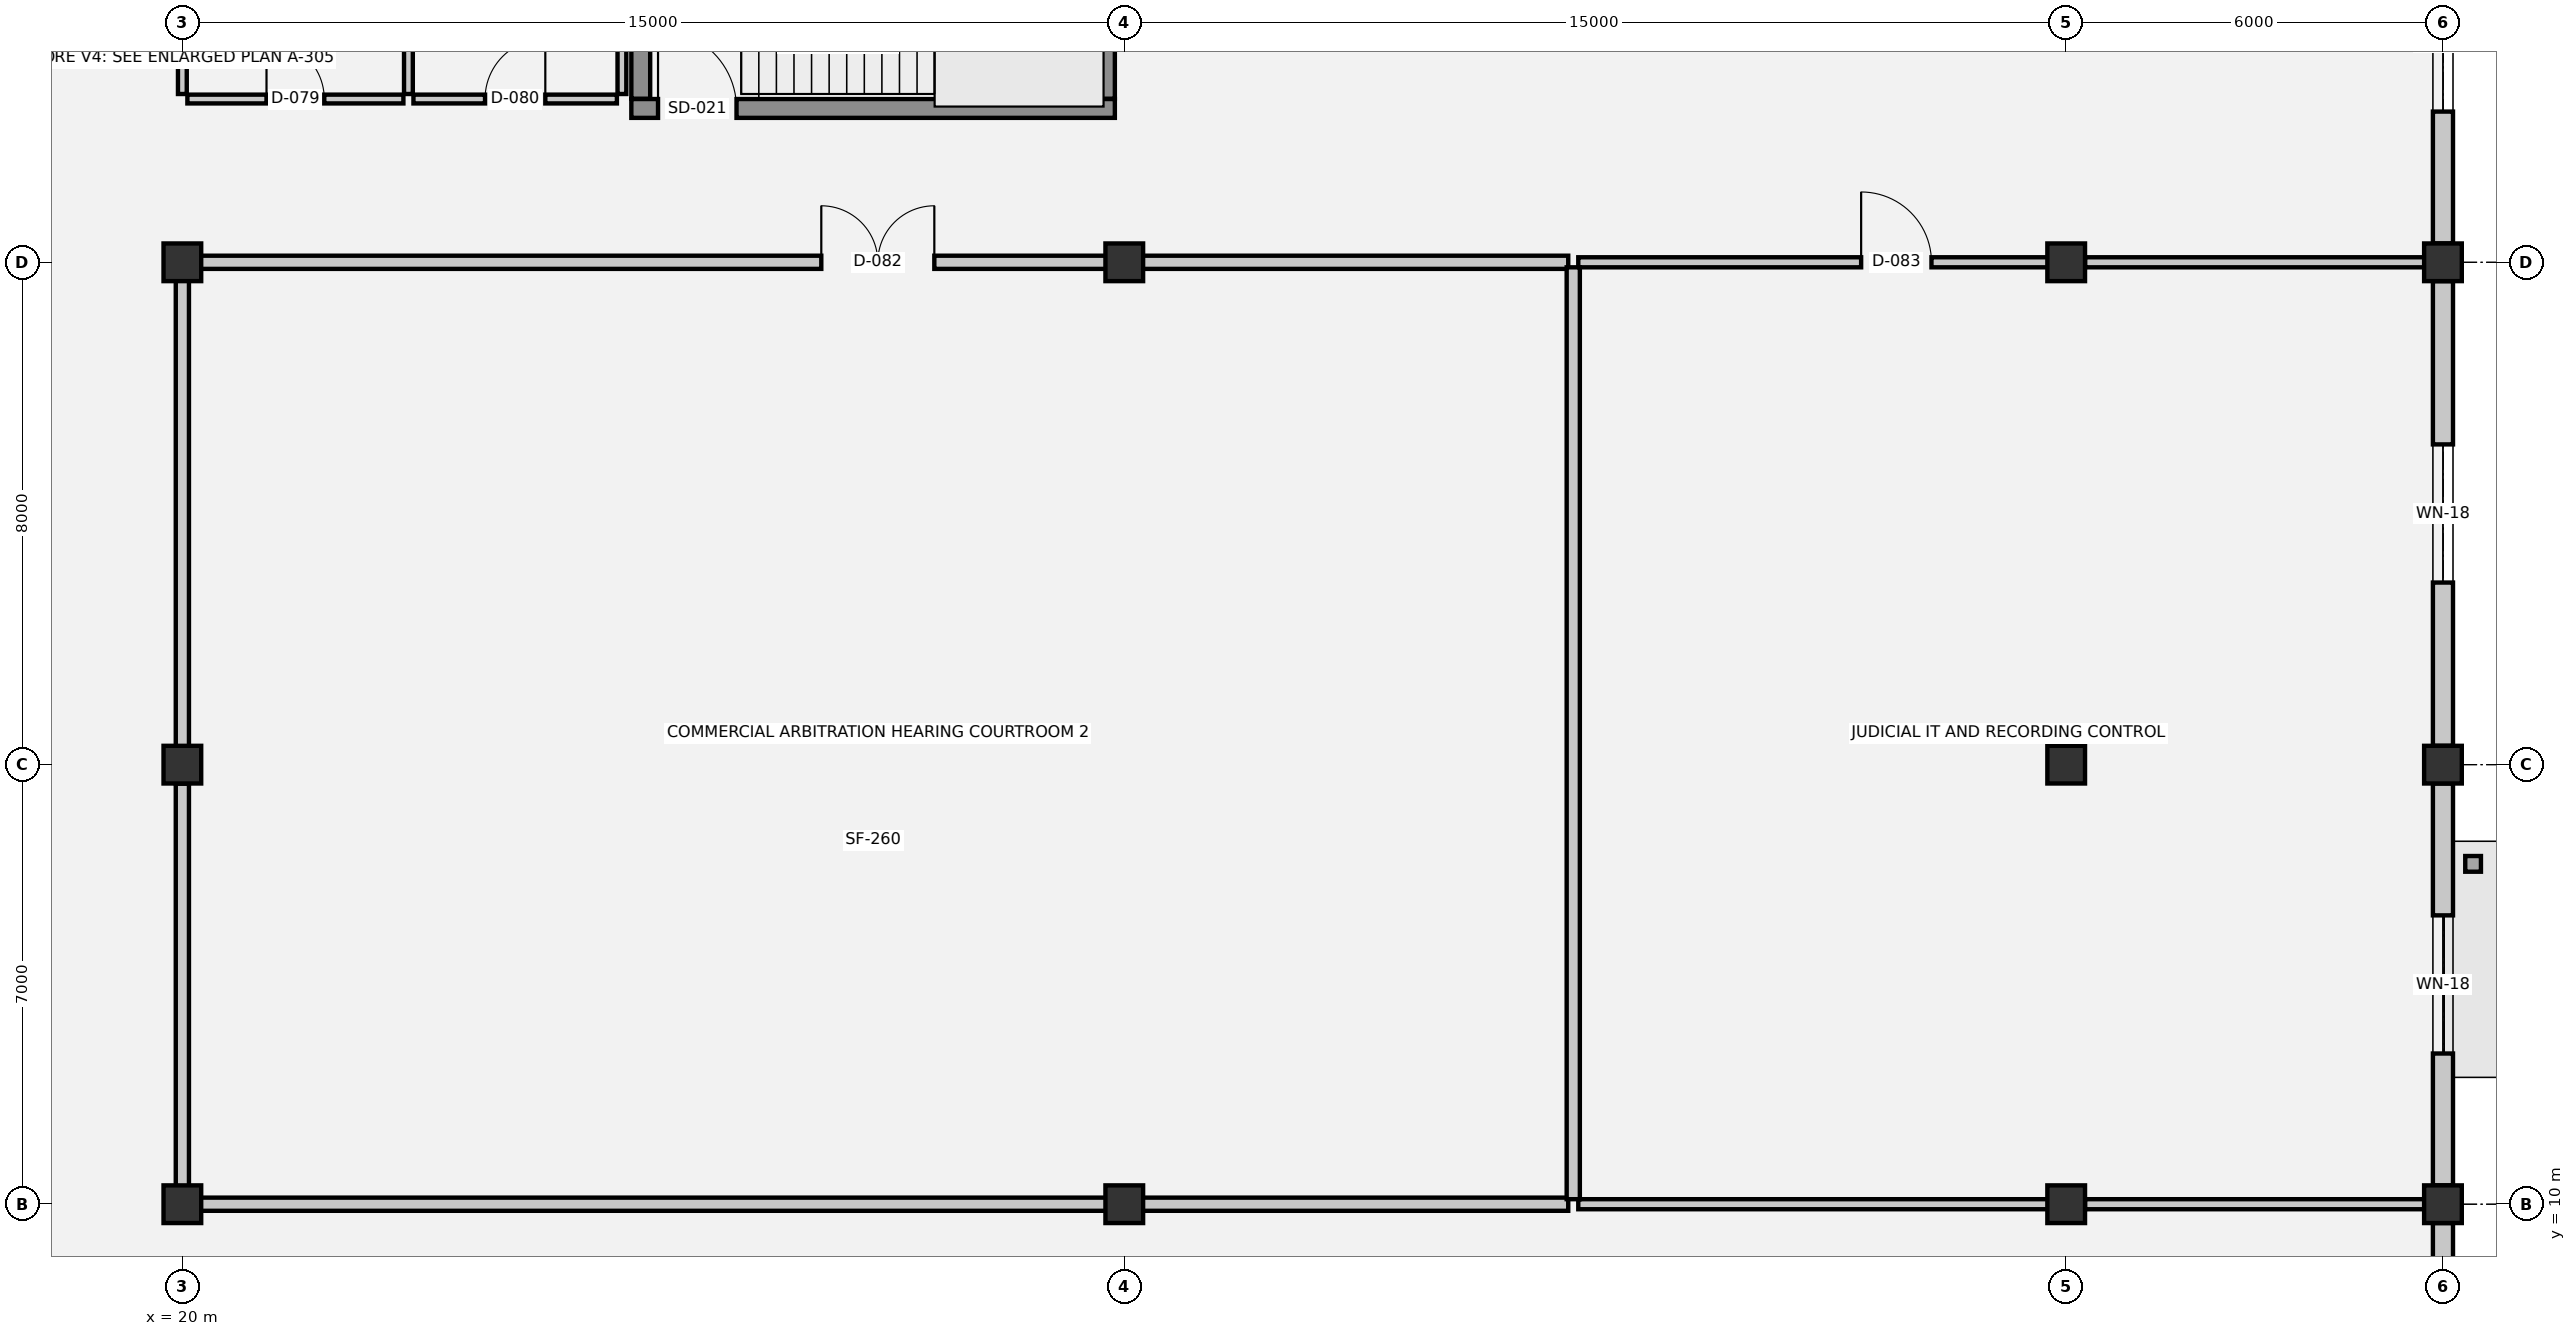
"""IFC4 building model, lengths in metres.
Left out: names, types, materials, properties, quantities, classifications, styles, units other than length and angle.
Written with IfcOpenShell. Run it as: python <this file> out.ifc"""

import sys

from ifc_helpers import new_model, si_unit, direction, frame, frame_2d, origin, origin_2d, place, context, subcontext, project, spatial, rectangle, extrude, element, fill, save


model = new_model("IFC4")
c1 = context("Model", 3, precision=1e-05, world=origin(), true_north=direction((0.0, 1.0)))
c2 = subcontext(c1, "Body", "Model", "MODEL_VIEW")
j1 = project(units=[si_unit("LENGTHUNIT", "METRE"), si_unit("PLANEANGLEUNIT", "RADIAN")], contexts=[c1])
p1 = place(None, origin())
s1 = spatial("IfcSite", under=j1, at=p1, CompositionType="ELEMENT")
p2 = place(p1, origin())
s2 = spatial("IfcBuilding", under=s1, at=p2, CompositionType="ELEMENT")
p3 = place(p2, frame((0.0, 0.0, 14.4)))
s3 = spatial("IfcBuildingStorey", under=s2, at=p3, CompositionType="ELEMENT", Elevation=14.4)
for number, where, z_axis, x_axis in (
    (1, (20.0, 10.0, 0.0), (0.0, 0.0, 1.0), (1.0, 0.0, 0.0)),
    (2, (20.0, 17.0, 0.0), (0.0, 0.0, 1.0), (1.0, 0.0, 0.0)),
    (3, (20.0, 25.0, 0.0), (0.0, 0.0, 1.0), (1.0, 0.0, 0.0)),
    (4, (35.0, 10.0, 0.0), (0.0, 0.0, 1.0), (1.0, 0.0, 0.0)),
    (5, (35.0, 25.0, 0.0), (0.0, 0.0, 1.0), (1.0, 0.0, 0.0)),
    (6, (50.0, 10.0, 0.0), (0.0, 0.0, 1.0), (1.0, 0.0, 0.0)),
    (7, (50.0, 17.0, 0.0), (0.0, 0.0, 1.0), (1.0, 0.0, 0.0)),
    (8, (50.0, 25.0, 0.0), (0.0, 0.0, 1.0), (1.0, 0.0, 0.0)),
    (9, (56.0, 10.0, 0.0), (0.0, 0.0, 1.0), (1.0, 0.0, 0.0)),
    (10, (56.0, 17.0, 0.0), (0.0, 0.0, 1.0), (1.0, 0.0, 0.0)),
    (11, (56.0, 25.0, 0.0), (0.0, 0.0, 1.0), (1.0, 0.0, 0.0)),
):
    element("IfcColumn", number, at=place(p3, frame(where, z_axis=z_axis, x_axis=x_axis)), inside=s3, PredefinedType="COLUMN", context=c2, shape_type="SweptSolid", body=[
        extrude(rectangle(XDim=0.6, YDim=0.6, at=origin_2d()), origin(), (0.0, 0.0, 1.0), 3.9),
    ])
p4 = place(p3, frame((56.0, 31.7, 0.0), z_axis=(0.0, 0.0, 1.0), x_axis=(0.0, -1.0, 0.0)))
e12 = element("IfcWall", 12, at=p4, inside=s3, PredefinedType="SOLIDWALL", context=c2, shape_type="SweptSolid", body=[
    extrude(rectangle(XDim=6.4, YDim=0.32, at=frame_2d((3.2, 0.0))), origin(), (0.0, 0.0, 1.0), 2.61),
])
p5 = place(p4, frame((2.1, 0.0, 0.9)))
e13 = element("IfcOpeningElement", 13, at=p5, cuts=e12, PredefinedType="OPENING", context=c2, shape_type="SweptSolid", body=[
    extrude(rectangle(XDim=2.2, YDim=1.0, at=frame_2d((1.1, 0.5))), frame((0.0, 0.17, 0.0), z_axis=(0.0, -1.0, 0.0), x_axis=(1.0, 0.0, 0.0)), (0.0, 0.0, 1.0), 0.34),
])
p6 = place(p3, frame((56.0, 24.7, 0.0), z_axis=(0.0, 0.0, 1.0), x_axis=(0.0, -1.0, 0.0)))
e14 = element("IfcWall", 14, at=p6, inside=s3, PredefinedType="SOLIDWALL", context=c2, shape_type="SweptSolid", body=[
    extrude(rectangle(XDim=7.4, YDim=0.32, at=frame_2d((3.7, 0.0))), origin(), (0.0, 0.0, 1.0), 2.61),
])
p7 = place(p6, frame((2.6, 0.0, 0.9)))
e15 = element("IfcOpeningElement", 15, at=p7, cuts=e14, PredefinedType="OPENING", context=c2, shape_type="SweptSolid", body=[
    extrude(rectangle(XDim=2.2, YDim=1.0, at=frame_2d((1.1, 0.5))), frame((0.0, 0.17, 0.0), z_axis=(0.0, -1.0, 0.0), x_axis=(1.0, 0.0, 0.0)), (0.0, 0.0, 1.0), 0.34),
])
p8 = place(p3, frame((56.0, 16.7, 0.0), z_axis=(0.0, 0.0, 1.0), x_axis=(0.0, -1.0, 0.0)))
e16 = element("IfcWall", 16, at=p8, inside=s3, PredefinedType="SOLIDWALL", context=c2, shape_type="SweptSolid", body=[
    extrude(rectangle(XDim=6.4, YDim=0.32, at=frame_2d((3.2, 0.0))), origin(), (0.0, 0.0, 1.0), 2.61),
])
p9 = place(p8, frame((2.1, 0.0, 0.9)))
e17 = element("IfcOpeningElement", 17, at=p9, cuts=e16, PredefinedType="OPENING", context=c2, shape_type="SweptSolid", body=[
    extrude(rectangle(XDim=2.2, YDim=1.0, at=frame_2d((1.1, 0.5))), frame((0.0, 0.17, 0.0), z_axis=(0.0, -1.0, 0.0), x_axis=(1.0, 0.0, 0.0)), (0.0, 0.0, 1.0), 0.34),
])
p10 = place(p3, frame((56.0, 9.7, 0.0), z_axis=(0.0, 0.0, 1.0), x_axis=(0.0, -1.0, 0.0)))
e18 = element("IfcWall", 18, at=p10, inside=s3, PredefinedType="SOLIDWALL", context=c2, shape_type="SweptSolid", body=[
    extrude(rectangle(XDim=5.4, YDim=0.32, at=frame_2d((2.7, 0.0))), origin(), (0.0, 0.0, 1.0), 2.61),
])
p11 = place(p10, frame((2.12, 0.0, 0.9)))
e19 = element("IfcOpeningElement", 19, at=p11, cuts=e18, PredefinedType="OPENING", context=c2, shape_type="SweptSolid", body=[
    extrude(rectangle(XDim=2.2, YDim=1.0, at=frame_2d((1.1, 0.5))), frame((0.0, 0.17, 0.0), z_axis=(0.0, -1.0, 0.0), x_axis=(1.0, 0.0, 0.0)), (0.0, 0.0, 1.0), 0.34),
])
p12 = place(p3, frame((15.05, 28.325, 0.0), z_axis=(0.0, 0.0, 1.0), x_axis=(1.0, 0.0, 0.0)))
e20 = element("IfcWall", 20, at=p12, inside=s3, PredefinedType="SHEAR", context=c2, shape_type="SweptSolid", body=[
    extrude(rectangle(XDim=2.9, YDim=0.25, at=frame_2d((1.45, 0.0))), origin(), (0.0, 0.0, 1.0), 3.9),
])
p13 = place(p12, frame((0.9, 0.0, 0.0)))
e21 = element("IfcOpeningElement", 21, at=p13, cuts=e20, PredefinedType="OPENING", context=c2, shape_type="SweptSolid", body=[
    extrude(rectangle(XDim=1.1, YDim=2.15, at=frame_2d((0.55, 1.075))), frame((0.0, 0.135, 0.0), z_axis=(0.0, -1.0, 0.0), x_axis=(1.0, 0.0, 0.0)), (0.0, 0.0, 1.0), 0.27),
])
p14 = place(p3, frame((27.15, 27.45, 0.0), z_axis=(0.0, 0.0, 1.0), x_axis=(1.0, 0.0, 0.0)))
e22 = element("IfcWall", 22, at=p14, inside=s3, PredefinedType="SHEAR", context=c2, shape_type="SweptSolid", body=[
    extrude(rectangle(XDim=7.7, YDim=0.3, at=frame_2d((3.85, 0.0))), origin(), (0.0, 0.0, 1.0), 3.64),
])
p15 = place(p14, frame((0.425, 0.0, 0.0)))
e23 = element("IfcOpeningElement", 23, at=p15, cuts=e22, PredefinedType="OPENING", context=c2, shape_type="SweptSolid", body=[
    extrude(rectangle(XDim=1.25, YDim=2.15, at=frame_2d((0.625, 1.075))), frame((0.0, 0.16, 0.0), z_axis=(0.0, -1.0, 0.0), x_axis=(1.0, 0.0, 0.0)), (0.0, 0.0, 1.0), 0.32),
])
for number, where, z_axis, x_axis in (
    (24, (27.3, 31.805, 0.0), (0.0, 0.0, 1.0), (0.0, -1.0, 0.0)),
    (25, (34.7, 27.605, 0.0), (0.0, 0.0, 1.0), (0.0, 1.0, 0.0)),
):
    element("IfcWall", number, at=place(p3, frame(where, z_axis=z_axis, x_axis=x_axis)), inside=s3, PredefinedType="SHEAR", context=c2, shape_type="SweptSolid", body=[
        extrude(rectangle(XDim=4.2, YDim=0.3, at=frame_2d((2.1, 0.0))), origin(), (0.0, 0.0, 1.0), 3.64),
    ])
p16 = place(p3, frame((20.08, 10.0, 0.0), z_axis=(0.0, 0.0, 1.0), x_axis=(1.0, 0.0, 0.0)))
e26 = element("IfcWall", 26, at=p16, inside=s3, PredefinedType="PARTITIONING", context=c2, shape_type="SweptSolid", body=[
    extrude(rectangle(XDim=21.99, YDim=0.21, at=frame_2d((10.995, 0.0))), origin(), (0.0, 0.0, 1.0), 2.63),
])
p17 = place(p3, frame((42.23, 10.0, 0.0), z_axis=(0.0, 0.0, 1.0), x_axis=(1.0, 0.0, 0.0)))
e27 = element("IfcWall", 27, at=p17, inside=s3, PredefinedType="PARTITIONING", context=c2, shape_type="SweptSolid", body=[
    extrude(rectangle(XDim=8.07, YDim=0.16, at=frame_2d((4.035, 0.0))), origin(), (0.0, 0.0, 1.0), 2.63),
])
p18 = place(p3, frame((50.3, 10.0, 0.0), z_axis=(0.0, 0.0, 1.0), x_axis=(1.0, 0.0, 0.0)))
e28 = element("IfcWall", 28, at=p18, inside=s3, PredefinedType="PARTITIONING", context=c2, shape_type="SweptSolid", body=[
    extrude(rectangle(XDim=5.62, YDim=0.16, at=frame_2d((2.81, 0.0))), origin(), (0.0, 0.0, 1.0), 2.88),
])
p19 = place(p3, frame((20.08, 25.0, 0.0), z_axis=(0.0, 0.0, 1.0), x_axis=(1.0, 0.0, 0.0)))
e29 = element("IfcWall", 29, at=p19, inside=s3, PredefinedType="PARTITIONING", context=c2, shape_type="SweptSolid", body=[
    extrude(rectangle(XDim=21.99, YDim=0.21, at=frame_2d((10.995, 0.0))), origin(), (0.0, 0.0, 1.0), 2.63),
])
p20 = place(p19, frame((10.095, 0.0, 0.0)))
e30 = element("IfcOpeningElement", 30, at=p20, cuts=e29, PredefinedType="OPENING", context=c2, shape_type="SweptSolid", body=[
    extrude(rectangle(XDim=1.8, YDim=2.3, at=frame_2d((0.9, 1.15))), frame((0.0, 0.115, 0.0), z_axis=(0.0, -1.0, 0.0), x_axis=(1.0, 0.0, 0.0)), (0.0, 0.0, 1.0), 0.23),
])
p21 = place(p3, frame((42.23, 25.0, 0.0), z_axis=(0.0, 0.0, 1.0), x_axis=(1.0, 0.0, 0.0)))
e31 = element("IfcWall", 31, at=p21, inside=s3, PredefinedType="PARTITIONING", context=c2, shape_type="SweptSolid", body=[
    extrude(rectangle(XDim=8.07, YDim=0.16, at=frame_2d((4.035, 0.0))), origin(), (0.0, 0.0, 1.0), 2.63),
])
p22 = place(p21, frame((4.504, 0.0, 0.0)))
e32 = element("IfcOpeningElement", 32, at=p22, cuts=e31, PredefinedType="OPENING", context=c2, shape_type="SweptSolid", body=[
    extrude(rectangle(XDim=1.12, YDim=2.2, at=frame_2d((0.56, 1.1))), frame((0.0, 0.09, 0.0), z_axis=(0.0, -1.0, 0.0), x_axis=(1.0, 0.0, 0.0)), (0.0, 0.0, 1.0), 0.18),
])
p23 = place(p3, frame((50.3, 25.0, 0.0), z_axis=(0.0, 0.0, 1.0), x_axis=(1.0, 0.0, 0.0)))
e33 = element("IfcWall", 33, at=p23, inside=s3, PredefinedType="PARTITIONING", context=c2, shape_type="SweptSolid", body=[
    extrude(rectangle(XDim=5.62, YDim=0.16, at=frame_2d((2.81, 0.0))), origin(), (0.0, 0.0, 1.0), 2.88),
])
p24 = place(p3, frame((20.08, 27.6, 0.0), z_axis=(0.0, 0.0, 1.0), x_axis=(1.0, 0.0, 0.0)))
e34 = element("IfcWall", 34, at=p24, inside=s3, PredefinedType="PLUMBINGWALL", context=c2, shape_type="SweptSolid", body=[
    extrude(rectangle(XDim=3.44, YDim=0.14, at=frame_2d((1.72, 0.0))), origin(), (0.0, 0.0, 1.0), 3.54),
])
p25 = place(p24, frame((1.26, 0.0, 0.0)))
e35 = element("IfcOpeningElement", 35, at=p25, cuts=e34, PredefinedType="OPENING", context=c2, shape_type="SweptSolid", body=[
    extrude(rectangle(XDim=0.92, YDim=2.1, at=frame_2d((0.46, 1.05))), frame((0.0, 0.08, 0.0), z_axis=(0.0, -1.0, 0.0), x_axis=(1.0, 0.0, 0.0)), (0.0, 0.0, 1.0), 0.16),
])
p26 = place(p3, frame((23.68, 27.6, 0.0), z_axis=(0.0, 0.0, 1.0), x_axis=(1.0, 0.0, 0.0)))
e36 = element("IfcWall", 36, at=p26, inside=s3, PredefinedType="PLUMBINGWALL", context=c2, shape_type="SweptSolid", body=[
    extrude(rectangle(XDim=3.24, YDim=0.14, at=frame_2d((1.62, 0.0))), origin(), (0.0, 0.0, 1.0), 3.54),
])
p27 = place(p26, frame((1.14, 0.0, 0.0)))
e37 = element("IfcOpeningElement", 37, at=p27, cuts=e36, PredefinedType="OPENING", context=c2, shape_type="SweptSolid", body=[
    extrude(rectangle(XDim=0.96, YDim=2.1, at=frame_2d((0.48, 1.05))), frame((0.0, 0.08, 0.0), z_axis=(0.0, -1.0, 0.0), x_axis=(1.0, 0.0, 0.0)), (0.0, 0.0, 1.0), 0.16),
])
p28 = place(p3, frame((20.0, 10.08, 0.0), z_axis=(0.0, 0.0, 1.0), x_axis=(0.0, 1.0, 0.0)))
e38 = element("IfcWall", 38, at=p28, inside=s3, PredefinedType="PARTITIONING", context=c2, shape_type="SweptSolid", body=[
    extrude(rectangle(XDim=6.62, YDim=0.21, at=frame_2d((3.31, 0.0))), origin(), (0.0, 0.0, 1.0), 3.03),
])
p29 = place(p3, frame((20.0, 16.7, 0.0), z_axis=(0.0, 0.0, 1.0), x_axis=(0.0, 1.0, 0.0)))
e39 = element("IfcWall", 39, at=p29, inside=s3, PredefinedType="PARTITIONING", context=c2, shape_type="SweptSolid", body=[
    extrude(rectangle(XDim=8.22, YDim=0.21, at=frame_2d((4.11, 0.0))), origin(), (0.0, 0.0, 1.0), 2.88),
])
p30 = place(p3, frame((20.0, 27.68, 0.0), z_axis=(0.0, 0.0, 1.0), x_axis=(0.0, 1.0, 0.0)))
e40 = element("IfcWall", 40, at=p30, inside=s3, PredefinedType="PLUMBINGWALL", context=c2, shape_type="SweptSolid", body=[
    extrude(rectangle(XDim=4.24, YDim=0.14, at=frame_2d((2.12, 0.0))), origin(), (0.0, 0.0, 1.0), 3.03),
])
for number, where, z_axis, x_axis in (
    (41, (23.6, 27.68, 0.0), (0.0, 0.0, 1.0), (0.0, 1.0, 0.0)),
    (42, (27.0, 27.68, 0.0), (0.0, 0.0, 1.0), (0.0, 1.0, 0.0)),
):
    element("IfcWall", number, at=place(p3, frame(where, z_axis=z_axis, x_axis=x_axis)), inside=s3, PredefinedType="PLUMBINGWALL", context=c2, shape_type="SweptSolid", body=[
        extrude(rectangle(XDim=4.24, YDim=0.14, at=frame_2d((2.12, 0.0))), origin(), (0.0, 0.0, 1.0), 3.54),
    ])
p31 = place(p3, frame((42.15, 10.08, 0.0), z_axis=(0.0, 0.0, 1.0), x_axis=(0.0, 1.0, 0.0)))
e43 = element("IfcWall", 43, at=p31, inside=s3, PredefinedType="PARTITIONING", context=c2, shape_type="SweptSolid", body=[
    extrude(rectangle(XDim=14.84, YDim=0.21, at=frame_2d((7.42, 0.0))), origin(), (0.0, 0.0, 1.0), 3.54),
])
p32 = place(p5, origin())
e44 = element("IfcWindow", 44, at=p32, inside=s3, PartitioningType="SINGLE_PANEL", PredefinedType="WINDOW", context=c2, shape_type="SweptSolid", body=[
    extrude(rectangle(XDim=2.2, YDim=1.0, at=frame_2d((1.1, 0.5))), frame((0.0, 0.03, 0.0), z_axis=(0.0, -1.0, 0.0), x_axis=(1.0, 0.0, 0.0)), (0.0, 0.0, 1.0), 0.06),
])
fill(e13, e44)
p33 = place(p7, origin())
e45 = element("IfcWindow", 45, at=p33, inside=s3, PartitioningType="SINGLE_PANEL", PredefinedType="WINDOW", context=c2, shape_type="SweptSolid", body=[
    extrude(rectangle(XDim=2.2, YDim=1.0, at=frame_2d((1.1, 0.5))), frame((0.0, 0.03, 0.0), z_axis=(0.0, -1.0, 0.0), x_axis=(1.0, 0.0, 0.0)), (0.0, 0.0, 1.0), 0.06),
])
fill(e15, e45)
p34 = place(p9, origin())
e46 = element("IfcWindow", 46, at=p34, inside=s3, PartitioningType="SINGLE_PANEL", PredefinedType="WINDOW", context=c2, shape_type="SweptSolid", body=[
    extrude(rectangle(XDim=2.2, YDim=1.0, at=frame_2d((1.1, 0.5))), frame((0.0, 0.03, 0.0), z_axis=(0.0, -1.0, 0.0), x_axis=(1.0, 0.0, 0.0)), (0.0, 0.0, 1.0), 0.06),
])
fill(e17, e46)
p35 = place(p15, origin())
e47 = element("IfcDoor", 47, at=p35, inside=s3, OperationType="SINGLE_SWING_LEFT", PredefinedType="DOOR", context=c2, shape_type="SweptSolid", body=[
    extrude(rectangle(XDim=1.25, YDim=2.15, at=frame_2d((0.625, 1.075))), frame((0.0, 0.025, 0.0), z_axis=(0.0, -1.0, 0.0), x_axis=(1.0, 0.0, 0.0)), (0.0, 0.0, 1.0), 0.05),
])
fill(e23, e47)
p36 = place(p25, origin())
e48 = element("IfcDoor", 48, at=p36, inside=s3, OperationType="SINGLE_SWING_LEFT", PredefinedType="DOOR", context=c2, shape_type="SweptSolid", body=[
    extrude(rectangle(XDim=0.92, YDim=2.1, at=frame_2d((0.46, 1.05))), frame((0.0, 0.025, 0.0), z_axis=(0.0, -1.0, 0.0), x_axis=(1.0, 0.0, 0.0)), (0.0, 0.0, 1.0), 0.05),
])
fill(e35, e48)
p37 = place(p27, origin())
e49 = element("IfcDoor", 49, at=p37, inside=s3, OperationType="SINGLE_SWING_RIGHT", PredefinedType="DOOR", context=c2, shape_type="SweptSolid", body=[
    extrude(rectangle(XDim=0.96, YDim=2.1, at=frame_2d((0.48, 1.05))), frame((0.0, 0.025, 0.0), z_axis=(0.0, -1.0, 0.0), x_axis=(1.0, 0.0, 0.0)), (0.0, 0.0, 1.0), 0.05),
])
fill(e37, e49)
p38 = place(p20, origin())
e50 = element("IfcDoor", 50, at=p38, inside=s3, OperationType="DOUBLE_DOOR_SINGLE_SWING", PredefinedType="DOOR", context=c2, shape_type="SweptSolid", body=[
    extrude(rectangle(XDim=1.8, YDim=2.3, at=frame_2d((0.9, 1.15))), frame((0.0, 0.025, 0.0), z_axis=(0.0, -1.0, 0.0), x_axis=(1.0, 0.0, 0.0)), (0.0, 0.0, 1.0), 0.05),
])
fill(e30, e50)
p39 = place(p22, origin())
e51 = element("IfcDoor", 51, at=p39, inside=s3, OperationType="SINGLE_SWING_LEFT", PredefinedType="DOOR", context=c2, shape_type="SweptSolid", body=[
    extrude(rectangle(XDim=1.12, YDim=2.2, at=frame_2d((0.56, 1.1))), frame((0.0, 0.025, 0.0), z_axis=(0.0, -1.0, 0.0), x_axis=(1.0, 0.0, 0.0)), (0.0, 0.0, 1.0), 0.05),
])
fill(e32, e51)
save(model, sys.argv[1])
